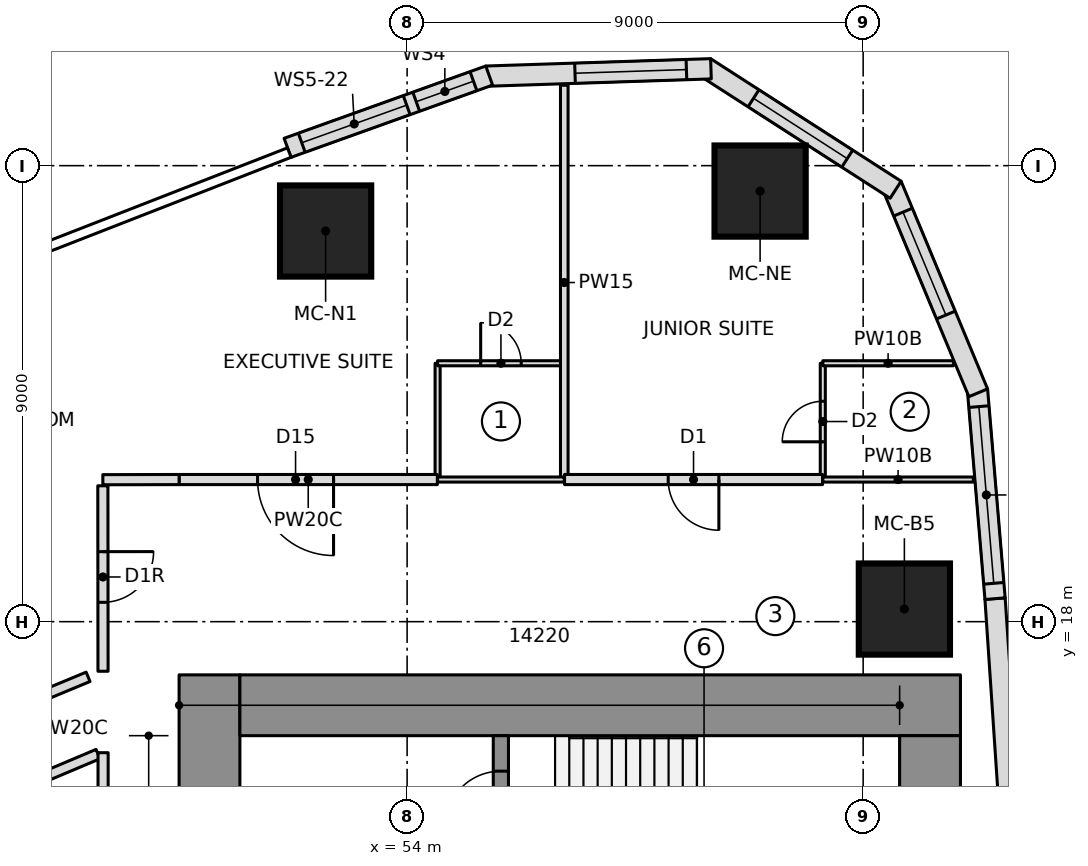
"""IFC4 building model, lengths in metres.
Left out: names, types, materials, properties, quantities, classifications, styles, units other than length and angle.
Written with IfcOpenShell. Run it as: python <this file> out.ifc"""

import sys

from ifc_helpers import new_model, si_unit, direction, frame, frame_2d, origin, origin_2d, place, context, subcontext, project, spatial, polyline, rectangle, outline, extrude, element, fill, save


model = new_model("IFC4")
c1 = context("Model", 3, precision=1e-05, world=origin(), true_north=direction((0.0, 1.0)))
c2 = subcontext(c1, "Body", "Model", "MODEL_VIEW")
j1 = project(units=[si_unit("LENGTHUNIT", "METRE"), si_unit("PLANEANGLEUNIT", "RADIAN")], contexts=[c1])
p1 = place(None, origin())
s1 = spatial("IfcSite", under=j1, at=p1, CompositionType="ELEMENT")
p2 = place(p1, origin())
s2 = spatial("IfcBuilding", under=s1, at=p2, CompositionType="ELEMENT")
p3 = place(p2, frame((0.0, 0.0, 71.55)))
s3 = spatial("IfcBuildingStorey", under=s2, at=p3, CompositionType="ELEMENT", Elevation=71.55)
p4 = place(p3, frame((50.1, 6.65, 0.0), z_axis=(0.0, 0.0, 1.0), x_axis=(0.0, 1.0, 0.0)))
e1 = element("IfcWall", 1, at=p4, inside=s3, PredefinedType="SHEAR", context=c2, shape_type="SweptSolid", body=[
    extrude(rectangle(XDim=10.3, YDim=1.2, at=frame_2d((5.15, 0.0))), origin(), (0.0, 0.0, 1.0), 3.55),
])
p5 = place(p4, frame((6.5, 0.0, 0.0)))
e2 = element("IfcOpeningElement", 2, at=p5, cuts=e1, PredefinedType="OPENING", context=c2, shape_type="SweptSolid", body=[
    extrude(rectangle(XDim=1.1, YDim=2.1, at=frame_2d((0.55, 1.05))), frame((0.0, 0.61, 0.0), z_axis=(0.0, -1.0, 0.0), x_axis=(1.0, 0.0, 0.0)), (0.0, 0.0, 1.0), 1.22),
])
p6 = place(p3, frame((50.7, 16.35, 0.0), z_axis=(0.0, 0.0, 1.0), x_axis=(1.0, 0.0, 0.0)))
e3 = element("IfcWall", 3, at=p6, inside=s3, PredefinedType="SHEAR", context=c2, shape_type="SweptSolid", body=[
    extrude(rectangle(XDim=14.22, YDim=1.2, at=frame_2d((7.11, 0.0))), origin(), (0.0, 0.0, 1.0), 3.55),
])
p7 = place(p3, frame((64.32, 9.95, 0.0), z_axis=(0.0, 0.0, 1.0), x_axis=(0.0, 1.0, 0.0)))
e4 = element("IfcWall", 4, at=p7, inside=s3, PredefinedType="SHEAR", context=c2, shape_type="SweptSolid", body=[
    extrude(rectangle(XDim=5.8, YDim=1.2, at=frame_2d((2.9, 0.0))), origin(), (0.0, 0.0, 1.0), 3.55),
])
p8 = place(p3, frame((55.85, 10.35, 0.0), z_axis=(0.0, 0.0, 1.0), x_axis=(0.0, 1.0, 0.0)))
e5 = element("IfcWall", 5, at=p8, inside=s3, PredefinedType="SHEAR", context=c2, shape_type="SweptSolid", body=[
    extrude(rectangle(XDim=5.4, YDim=0.3, at=frame_2d((2.7, 0.0))), origin(), (0.0, 0.0, 1.0), 3.55),
])
p9 = place(p8, frame((1.43, 0.0, 0.0)))
e6 = element("IfcOpeningElement", 6, at=p9, cuts=e5, PredefinedType="OPENING", context=c2, shape_type="SweptSolid", body=[
    extrude(rectangle(XDim=1.1, YDim=2.1, at=frame_2d((0.55, 1.05))), frame((0.0, 0.16, 0.0), z_axis=(0.0, -1.0, 0.0), x_axis=(1.0, 0.0, 0.0)), (0.0, 0.0, 1.0), 0.32),
])
p10 = place(p8, frame((3.6, 0.0, 0.0)))
e7 = element("IfcOpeningElement", 7, at=p10, cuts=e5, PredefinedType="OPENING", context=c2, shape_type="SweptSolid", body=[
    extrude(rectangle(XDim=1.1, YDim=2.1, at=frame_2d((0.55, 1.05))), frame((0.0, 0.16, 0.0), z_axis=(0.0, -1.0, 0.0), x_axis=(1.0, 0.0, 0.0)), (0.0, 0.0, 1.0), 0.32),
])
for number, where, z_axis, x_axis in (
    (8, (63.813, 18.249, 0.0), (0.0, 0.0, 1.0), (1.0, 0.0, 0.0)),
    (9, (60.966, 26.499, 0.0), (0.0, 0.0, 1.0), (1.0, 0.0, 0.0)),
    (10, (52.392, 25.71, 0.0), (0.0, 0.0, 1.0), (1.0, 0.0, 0.0)),
):
    element("IfcColumn", number, at=place(p3, frame(where, z_axis=z_axis, x_axis=x_axis)), inside=s3, PredefinedType="COLUMN", context=c2, shape_type="SweptSolid", body=[
        extrude(rectangle(XDim=1.8, YDim=1.8, at=origin_2d()), origin(), (0.0, 0.0, 1.0), 3.55),
    ])
p11 = place(p3, frame((65.878, 14.36, 0.0), z_axis=(0.0, 0.0, 1.0), x_axis=(-0.067087430225, 0.997747100575, 0.0)))
e11 = element("IfcWall", 11, at=p11, inside=s3, PredefinedType="NOTDEFINED", context=c2, shape_type="SweptSolid", body=[
    extrude(outline(polyline([(-0.002, -0.2), (4.107, -0.2), (4.103, 0.2), (0.002, 0.2), (-0.002, -0.2)])), origin(), (0.0, 0.0, 1.0), 3.25),
])
p12 = place(p3, frame((65.603, 18.455, 0.0), z_axis=(0.0, 0.0, 1.0), x_axis=(-0.083793550906, 0.996483136248, 0.0)))
e12 = element("IfcWall", 12, at=p12, inside=s3, PredefinedType="NOTDEFINED", context=c2, shape_type="SweptSolid", body=[
    extrude(outline(polyline([(-0.002, -0.2), (4.136, -0.2), (4.074, 0.2), (0.002, 0.2), (-0.002, -0.2)])), origin(), (0.0, 0.0, 1.0), 3.25),
])
p13 = place(p12, frame((0.302, 0.0, 0.9)))
e13 = element("IfcOpeningElement", 13, at=p13, cuts=e12, PredefinedType="OPENING", context=c2, shape_type="SweptSolid", body=[
    extrude(rectangle(XDim=3.5, YDim=1.8, at=frame_2d((1.75, 0.9))), frame((0.0, 0.21, 0.0), z_axis=(0.0, -1.0, 0.0), x_axis=(1.0, 0.0, 0.0)), (0.0, 0.0, 1.0), 0.42),
])
p14 = place(p3, frame((65.259, 22.546, 0.0), z_axis=(0.0, 0.0, 1.0), x_axis=(-0.384372042685, 0.923178277908, 0.0)))
e14 = element("IfcWall", 14, at=p14, inside=s3, PredefinedType="NOTDEFINED", context=c2, shape_type="SweptSolid", body=[
    extrude(outline(polyline([(-0.031, -0.2), (4.408, -0.2), (4.283, 0.2), (0.031, 0.2), (-0.031, -0.2)])), origin(), (0.0, 0.0, 1.0), 3.25),
])
p15 = place(p14, frame((1.631, 0.0, 0.6)))
e15 = element("IfcOpeningElement", 15, at=p15, cuts=e14, PredefinedType="OPENING", context=c2, shape_type="SweptSolid", body=[
    extrude(outline(polyline([(0.0, 1.35), (0.084, 1.771), (0.322, 2.128), (0.679, 2.366), (1.1, 2.45), (1.521, 2.366), (1.878, 2.128), (2.116, 1.771), (2.2, 1.35), (2.2, 1.1), (2.116, 0.679), (1.878, 0.322), (1.521, 0.084), (1.1, 0.0), (0.679, 0.084), (0.322, 0.322), (0.084, 0.679), (0.0, 1.1), (0.0, 1.35)])), frame((0.0, 0.21, 0.0), z_axis=(0.0, -1.0, 0.0), x_axis=(1.0, 0.0, 0.0)), (0.0, 0.0, 1.0), 0.42),
])
p16 = place(p3, frame((63.588, 26.558, 0.0), z_axis=(0.0, 0.0, 1.0), x_axis=(-0.840937468718, 0.541132307025, 0.0)))
e16 = element("IfcWall", 16, at=p16, inside=s3, PredefinedType="NOTDEFINED", context=c2, shape_type="SweptSolid", body=[
    extrude(outline(polyline([(-0.062, -0.2), (4.409, -0.2), (4.284, 0.2), (0.062, 0.2), (-0.062, -0.2)])), origin(), (0.0, 0.0, 1.0), 3.25),
])
p17 = place(p16, frame((1.073, 0.0, 0.6)))
e17 = element("IfcOpeningElement", 17, at=p17, cuts=e16, PredefinedType="OPENING", context=c2, shape_type="SweptSolid", body=[
    extrude(outline(polyline([(0.0, 1.35), (0.084, 1.771), (0.322, 2.128), (0.679, 2.366), (1.1, 2.45), (1.521, 2.366), (1.878, 2.128), (2.116, 1.771), (2.2, 1.35), (2.2, 1.1), (2.116, 0.679), (1.878, 0.322), (1.521, 0.084), (1.1, 0.0), (0.679, 0.084), (0.322, 0.322), (0.084, 0.679), (0.0, 1.1), (0.0, 1.35)])), frame((0.0, 0.21, 0.0), z_axis=(0.0, -1.0, 0.0), x_axis=(1.0, 0.0, 0.0)), (0.0, 0.0, 1.0), 0.42),
])
p18 = place(p3, frame((59.934, 28.91, 0.0), z_axis=(0.0, 0.0, 1.0), x_axis=(-0.999463576228, -0.032749958686, 0.0)))
e18 = element("IfcWall", 18, at=p18, inside=s3, PredefinedType="NOTDEFINED", context=c2, shape_type="SweptSolid", body=[
    extrude(outline(polyline([(-0.062, -0.2), (4.378, -0.2), (4.315, 0.2), (0.062, 0.2), (-0.062, -0.2)])), origin(), (0.0, 0.0, 1.0), 3.25),
])
p19 = place(p18, frame((0.422, 0.0, 0.6)))
e19 = element("IfcOpeningElement", 19, at=p19, cuts=e18, PredefinedType="OPENING", context=c2, shape_type="SweptSolid", body=[
    extrude(outline(polyline([(0.0, 1.35), (0.084, 1.771), (0.322, 2.128), (0.679, 2.366), (1.1, 2.45), (1.521, 2.366), (1.878, 2.128), (2.116, 1.771), (2.2, 1.35), (2.2, 1.1), (2.116, 0.679), (1.878, 0.322), (1.521, 0.084), (1.1, 0.0), (0.679, 0.084), (0.322, 0.322), (0.084, 0.679), (0.0, 1.1), (0.0, 1.35)])), frame((0.0, 0.21, 0.0), z_axis=(0.0, -1.0, 0.0), x_axis=(1.0, 0.0, 0.0)), (0.0, 0.0, 1.0), 0.42),
])
p20 = place(p3, frame((55.59, 28.768, 0.0), z_axis=(0.0, 0.0, 1.0), x_axis=(-0.941339752885, -0.337460323057, 0.0)))
e20 = element("IfcWall", 20, at=p20, inside=s3, PredefinedType="NOTDEFINED", context=c2, shape_type="SweptSolid", body=[
    extrude(outline(polyline([(-0.031, -0.2), (4.196, -0.2), (4.196, 0.2), (0.031, 0.2), (-0.031, -0.2)])), origin(), (0.0, 0.0, 1.0), 3.25),
])
p21 = place(p20, frame((0.298, 0.0, 0.9)))
e21 = element("IfcOpeningElement", 21, at=p21, cuts=e20, PredefinedType="OPENING", context=c2, shape_type="SweptSolid", body=[
    extrude(rectangle(XDim=1.2, YDim=1.8, at=frame_2d((0.6, 0.9))), frame((0.0, 0.21, 0.0), z_axis=(0.0, -1.0, 0.0), x_axis=(1.0, 0.0, 0.0)), (0.0, 0.0, 1.0), 0.42),
])
p22 = place(p20, frame((1.698, 0.0, 0.9)))
e22 = element("IfcOpeningElement", 22, at=p22, cuts=e20, PredefinedType="OPENING", context=c2, shape_type="SweptSolid", body=[
    extrude(rectangle(XDim=2.2, YDim=1.8, at=frame_2d((1.1, 0.9))), frame((0.0, 0.21, 0.0), z_axis=(0.0, -1.0, 0.0), x_axis=(1.0, 0.0, 0.0)), (0.0, 0.0, 1.0), 0.42),
])
p23 = place(p3, frame((54.602, 20.8, 0.0), z_axis=(0.0, 0.0, 1.0), x_axis=(0.0, 1.0, 0.0)))
e23 = element("IfcWall", 23, at=p23, inside=s3, PredefinedType="PARTITIONING", context=c2, shape_type="SweptSolid", body=[
    extrude(rectangle(XDim=2.3, YDim=0.1, at=frame_2d((1.15, 0.0))), origin(), (0.0, 0.0, 1.0), 3.15),
])
p24 = place(p3, frame((54.602, 23.1, 0.0), z_axis=(0.0, 0.0, 1.0), x_axis=(1.0, 0.0, 0.0)))
e24 = element("IfcWall", 24, at=p24, inside=s3, PredefinedType="PARTITIONING", context=c2, shape_type="SweptSolid", body=[
    extrude(rectangle(XDim=2.5, YDim=0.1, at=frame_2d((1.25, 0.0))), origin(), (0.0, 0.0, 1.0), 3.15),
])
p25 = place(p24, frame((0.85, 0.0, 0.0)))
e25 = element("IfcOpeningElement", 25, at=p25, cuts=e24, PredefinedType="OPENING", context=c2, shape_type="SweptSolid", body=[
    extrude(rectangle(XDim=0.8, YDim=2.1, at=frame_2d((0.4, 1.05))), frame((0.0, 0.06, 0.0), z_axis=(0.0, -1.0, 0.0), x_axis=(1.0, 0.0, 0.0)), (0.0, 0.0, 1.0), 0.12),
])
p26 = place(p3, frame((62.203, 20.8, 0.0), z_axis=(0.0, 0.0, 1.0), x_axis=(0.0, 1.0, 0.0)))
e26 = element("IfcWall", 26, at=p26, inside=s3, PredefinedType="PARTITIONING", context=c2, shape_type="SweptSolid", body=[
    extrude(rectangle(XDim=2.3, YDim=0.1, at=frame_2d((1.15, 0.0))), origin(), (0.0, 0.0, 1.0), 3.15),
])
p27 = place(p26, frame((0.75, 0.0, 0.0)))
e27 = element("IfcOpeningElement", 27, at=p27, cuts=e26, PredefinedType="OPENING", context=c2, shape_type="SweptSolid", body=[
    extrude(rectangle(XDim=0.8, YDim=2.1, at=frame_2d((0.4, 1.05))), frame((0.0, 0.06, 0.0), z_axis=(0.0, -1.0, 0.0), x_axis=(1.0, 0.0, 0.0)), (0.0, 0.0, 1.0), 0.12),
])
p28 = place(p3, frame((62.203, 23.1, 0.0), z_axis=(0.0, 0.0, 1.0), x_axis=(1.0, 0.0, 0.0)))
e28 = element("IfcWall", 28, at=p28, inside=s3, PredefinedType="PARTITIONING", context=c2, shape_type="SweptSolid", body=[
    extrude(rectangle(XDim=2.578, YDim=0.1, at=frame_2d((1.289, 0.0))), origin(), (0.0, 0.0, 1.0), 3.15),
])
p29 = place(p3, frame((57.102, 20.8, 0.0), z_axis=(0.0, 0.0, 1.0), x_axis=(0.0, 1.0, 0.0)))
e29 = element("IfcWall", 29, at=p29, inside=s3, PredefinedType="PARTITIONING", context=c2, shape_type="SweptSolid", body=[
    extrude(rectangle(XDim=7.787, YDim=0.15, at=frame_2d((3.894, 0.0))), origin(), (0.0, 0.0, 1.0), 3.15),
])
p30 = place(p3, frame((43.85, 13.677, 0.0), z_axis=(0.0, 0.0, 1.0), x_axis=(0.921265924084, 0.388933281068, 0.0)))
e30 = element("IfcWall", 30, at=p30, inside=s3, PredefinedType="PARTITIONING", context=c2, shape_type="SweptSolid", body=[
    extrude(rectangle(XDim=4.396, YDim=0.2, at=frame_2d((2.198, 0.0))), origin(), (0.0, 0.0, 1.0), 3.15),
])
p31 = place(p30, frame((1.508, 0.0, 0.0)))
e31 = element("IfcOpeningElement", 31, at=p31, cuts=e30, PredefinedType="OPENING", context=c2, shape_type="SweptSolid", body=[
    extrude(rectangle(XDim=1.5, YDim=2.1, at=frame_2d((0.75, 1.05))), frame((0.0, 0.11, 0.0), z_axis=(0.0, -1.0, 0.0), x_axis=(1.0, 0.0, 0.0)), (0.0, 0.0, 1.0), 0.22),
])
p32 = place(p3, frame((54.597, 20.805, 0.0), z_axis=(0.0, 0.0, 1.0), x_axis=(-1.0, 0.0, 0.0)))
e32 = element("IfcWall", 32, at=p32, inside=s3, PredefinedType="PARTITIONING", context=c2, shape_type="SweptSolid", body=[
    extrude(rectangle(XDim=5.097, YDim=0.2, at=frame_2d((2.548, 0.0))), origin(), (0.0, 0.0, 1.0), 3.15),
])
p33 = place(p32, frame((2.048, 0.0, 0.0)))
e33 = element("IfcOpeningElement", 33, at=p33, cuts=e32, PredefinedType="OPENING", context=c2, shape_type="SweptSolid", body=[
    extrude(rectangle(XDim=1.5, YDim=2.1, at=frame_2d((0.75, 1.05))), frame((0.0, 0.11, 0.0), z_axis=(0.0, -1.0, 0.0), x_axis=(1.0, 0.0, 0.0)), (0.0, 0.0, 1.0), 0.22),
])
p34 = place(p3, frame((62.198, 20.805, 0.0), z_axis=(0.0, 0.0, 1.0), x_axis=(-1.0, 0.0, 0.0)))
e34 = element("IfcWall", 34, at=p34, inside=s3, PredefinedType="PARTITIONING", context=c2, shape_type="SweptSolid", body=[
    extrude(rectangle(XDim=5.092, YDim=0.2, at=frame_2d((2.546, 0.0))), origin(), (0.0, 0.0, 1.0), 3.15),
])
p35 = place(p34, frame((2.046, 0.0, 0.0)))
e35 = element("IfcOpeningElement", 35, at=p35, cuts=e34, PredefinedType="OPENING", context=c2, shape_type="SweptSolid", body=[
    extrude(rectangle(XDim=1.0, YDim=2.1, at=frame_2d((0.5, 1.05))), frame((0.0, 0.11, 0.0), z_axis=(0.0, -1.0, 0.0), x_axis=(1.0, 0.0, 0.0)), (0.0, 0.0, 1.0), 0.22),
])
p36 = place(p3, frame((57.102, 20.805, 0.0), z_axis=(0.0, 0.0, 1.0), x_axis=(-1.0, 0.0, 0.0)))
e36 = element("IfcWall", 36, at=p36, inside=s3, PredefinedType="PARTITIONING", context=c2, shape_type="SweptSolid", body=[
    extrude(rectangle(XDim=2.5, YDim=0.1, at=frame_2d((1.25, 0.0))), origin(), (0.0, 0.0, 1.0), 3.15),
])
p37 = place(p3, frame((65.175, 20.805, 0.0), z_axis=(0.0, 0.0, 1.0), x_axis=(-1.0, 0.0, 0.0)))
e37 = element("IfcWall", 37, at=p37, inside=s3, PredefinedType="PARTITIONING", context=c2, shape_type="SweptSolid", body=[
    extrude(rectangle(XDim=2.971, YDim=0.1, at=frame_2d((1.486, 0.0))), origin(), (0.0, 0.0, 1.0), 3.15),
])
p38 = place(p3, frame((47.704, 16.911, 0.0), z_axis=(0.0, 0.0, 1.0), x_axis=(-0.923461497361, -0.383691103484, 0.0)))
e38 = element("IfcWall", 38, at=p38, inside=s3, PredefinedType="PARTITIONING", context=c2, shape_type="SweptSolid", body=[
    extrude(rectangle(XDim=5.328, YDim=0.2, at=frame_2d((2.664, 0.0))), origin(), (0.0, 0.0, 1.0), 3.15),
])
p39 = place(p3, frame((48.0, 15.414, 0.0), z_axis=(0.0, 0.0, 1.0), x_axis=(0.0, -1.0, 0.0)))
e39 = element("IfcWall", 39, at=p39, inside=s3, PredefinedType="PARTITIONING", context=c2, shape_type="SweptSolid", body=[
    extrude(rectangle(XDim=30.828, YDim=0.2, at=frame_2d((15.414, 0.0))), origin(), (0.0, 0.0, 1.0), 3.15),
])
p40 = place(p3, frame((49.5, 20.805, 0.0), z_axis=(0.0, 0.0, 1.0), x_axis=(-0.999998104399, -0.001947099992, 0.0)))
e40 = element("IfcWall", 40, at=p40, inside=s3, PredefinedType="PARTITIONING", context=c2, shape_type="SweptSolid", body=[
    extrude(rectangle(XDim=1.505, YDim=0.2, at=frame_2d((0.752, 0.0))), origin(), (0.0, 0.0, 1.0), 3.15),
])
p41 = place(p3, frame((47.996, 20.682, 0.0), z_axis=(0.0, 0.0, 1.0), x_axis=(0.000866955326, -0.999999624194, 0.0)))
e41 = element("IfcWall", 41, at=p41, inside=s3, PredefinedType="PARTITIONING", context=c2, shape_type="SweptSolid", body=[
    extrude(rectangle(XDim=3.661, YDim=0.2, at=frame_2d((1.831, 0.0))), origin(), (0.0, 0.0, 1.0), 3.15),
])
p42 = place(p41, frame((1.3, 0.0, 0.0)))
e42 = element("IfcOpeningElement", 42, at=p42, cuts=e41, PredefinedType="OPENING", context=c2, shape_type="SweptSolid", body=[
    extrude(rectangle(XDim=1.0, YDim=2.1, at=frame_2d((0.5, 1.05))), frame((0.0, 0.11, 0.0), z_axis=(0.0, -1.0, 0.0), x_axis=(1.0, 0.0, 0.0)), (0.0, 0.0, 1.0), 0.22),
])
p43 = place(p13, origin())
e43 = element("IfcWindow", 43, at=p43, inside=s3, PartitioningType="SINGLE_PANEL", PredefinedType="WINDOW", context=c2, shape_type="SweptSolid", body=[
    extrude(rectangle(XDim=3.5, YDim=1.8, at=frame_2d((1.75, 0.9))), frame((0.0, 0.17, 0.0), z_axis=(0.0, -1.0, 0.0), x_axis=(1.0, 0.0, 0.0)), (0.0, 0.0, 1.0), 0.06),
])
fill(e13, e43)
p44 = place(p15, origin())
e44 = element("IfcWindow", 44, at=p44, inside=s3, PartitioningType="SINGLE_PANEL", PredefinedType="WINDOW", context=c2, shape_type="SweptSolid", body=[
    extrude(outline(polyline([(0.0, 1.35), (0.084, 1.771), (0.322, 2.128), (0.679, 2.366), (1.1, 2.45), (1.521, 2.366), (1.878, 2.128), (2.116, 1.771), (2.2, 1.35), (2.2, 1.1), (2.116, 0.679), (1.878, 0.322), (1.521, 0.084), (1.1, 0.0), (0.679, 0.084), (0.322, 0.322), (0.084, 0.679), (0.0, 1.1), (0.0, 1.35)])), frame((0.0, 0.17, 0.0), z_axis=(0.0, -1.0, 0.0), x_axis=(1.0, 0.0, 0.0)), (0.0, 0.0, 1.0), 0.06),
])
fill(e15, e44)
p45 = place(p17, origin())
e45 = element("IfcWindow", 45, at=p45, inside=s3, PartitioningType="SINGLE_PANEL", PredefinedType="WINDOW", context=c2, shape_type="SweptSolid", body=[
    extrude(outline(polyline([(0.0, 1.35), (0.084, 1.771), (0.322, 2.128), (0.679, 2.366), (1.1, 2.45), (1.521, 2.366), (1.878, 2.128), (2.116, 1.771), (2.2, 1.35), (2.2, 1.1), (2.116, 0.679), (1.878, 0.322), (1.521, 0.084), (1.1, 0.0), (0.679, 0.084), (0.322, 0.322), (0.084, 0.679), (0.0, 1.1), (0.0, 1.35)])), frame((0.0, 0.17, 0.0), z_axis=(0.0, -1.0, 0.0), x_axis=(1.0, 0.0, 0.0)), (0.0, 0.0, 1.0), 0.06),
])
fill(e17, e45)
p46 = place(p19, origin())
e46 = element("IfcWindow", 46, at=p46, inside=s3, PartitioningType="SINGLE_PANEL", PredefinedType="WINDOW", context=c2, shape_type="SweptSolid", body=[
    extrude(outline(polyline([(0.0, 1.35), (0.084, 1.771), (0.322, 2.128), (0.679, 2.366), (1.1, 2.45), (1.521, 2.366), (1.878, 2.128), (2.116, 1.771), (2.2, 1.35), (2.2, 1.1), (2.116, 0.679), (1.878, 0.322), (1.521, 0.084), (1.1, 0.0), (0.679, 0.084), (0.322, 0.322), (0.084, 0.679), (0.0, 1.1), (0.0, 1.35)])), frame((0.0, 0.17, 0.0), z_axis=(0.0, -1.0, 0.0), x_axis=(1.0, 0.0, 0.0)), (0.0, 0.0, 1.0), 0.06),
])
fill(e19, e46)
p47 = place(p21, origin())
e47 = element("IfcWindow", 47, at=p47, inside=s3, PartitioningType="SINGLE_PANEL", PredefinedType="WINDOW", context=c2, shape_type="SweptSolid", body=[
    extrude(rectangle(XDim=1.2, YDim=1.8, at=frame_2d((0.6, 0.9))), frame((0.0, 0.17, 0.0), z_axis=(0.0, -1.0, 0.0), x_axis=(1.0, 0.0, 0.0)), (0.0, 0.0, 1.0), 0.06),
])
fill(e21, e47)
p48 = place(p22, origin())
e48 = element("IfcWindow", 48, at=p48, inside=s3, PartitioningType="SINGLE_PANEL", PredefinedType="WINDOW", context=c2, shape_type="SweptSolid", body=[
    extrude(rectangle(XDim=2.2, YDim=1.8, at=frame_2d((1.1, 0.9))), frame((0.0, 0.17, 0.0), z_axis=(0.0, -1.0, 0.0), x_axis=(1.0, 0.0, 0.0)), (0.0, 0.0, 1.0), 0.06),
])
fill(e22, e48)
p49 = place(p25, origin())
e49 = element("IfcDoor", 49, at=p49, inside=s3, OperationType="SINGLE_SWING_LEFT", PredefinedType="DOOR", context=c2, shape_type="SweptSolid", body=[
    extrude(rectangle(XDim=0.8, YDim=2.1, at=frame_2d((0.4, 1.05))), frame((0.0, 0.025, 0.0), z_axis=(0.0, -1.0, 0.0), x_axis=(1.0, 0.0, 0.0)), (0.0, 0.0, 1.0), 0.05),
])
fill(e25, e49)
p50 = place(p27, origin())
e50 = element("IfcDoor", 50, at=p50, inside=s3, OperationType="SINGLE_SWING_LEFT", PredefinedType="DOOR", context=c2, shape_type="SweptSolid", body=[
    extrude(rectangle(XDim=0.8, YDim=2.1, at=frame_2d((0.4, 1.05))), frame((0.0, 0.025, 0.0), z_axis=(0.0, -1.0, 0.0), x_axis=(1.0, 0.0, 0.0)), (0.0, 0.0, 1.0), 0.05),
])
fill(e27, e50)
p51 = place(p33, origin())
e51 = element("IfcDoor", 51, at=p51, inside=s3, OperationType="DOUBLE_DOOR_SINGLE_SWING", PredefinedType="DOOR", context=c2, shape_type="SweptSolid", body=[
    extrude(rectangle(XDim=1.5, YDim=2.1, at=frame_2d((0.75, 1.05))), frame((0.0, 0.025, 0.0), z_axis=(0.0, -1.0, 0.0), x_axis=(1.0, 0.0, 0.0)), (0.0, 0.0, 1.0), 0.05),
])
fill(e33, e51)
p52 = place(p35, origin())
e52 = element("IfcDoor", 52, at=p52, inside=s3, OperationType="SINGLE_SWING_LEFT", PredefinedType="DOOR", context=c2, shape_type="SweptSolid", body=[
    extrude(rectangle(XDim=1.0, YDim=2.1, at=frame_2d((0.5, 1.05))), frame((0.0, 0.025, 0.0), z_axis=(0.0, -1.0, 0.0), x_axis=(1.0, 0.0, 0.0)), (0.0, 0.0, 1.0), 0.05),
])
fill(e35, e52)
p53 = place(p42, origin())
e53 = element("IfcDoor", 53, at=p53, inside=s3, OperationType="SINGLE_SWING_RIGHT", PredefinedType="DOOR", context=c2, shape_type="SweptSolid", body=[
    extrude(rectangle(XDim=1.0, YDim=2.1, at=frame_2d((0.5, 1.05))), frame((0.0, 0.025, 0.0), z_axis=(0.0, -1.0, 0.0), x_axis=(1.0, 0.0, 0.0)), (0.0, 0.0, 1.0), 0.05),
])
fill(e42, e53)
p54 = place(p10, origin())
e54 = element("IfcDoor", 54, at=p54, inside=s3, OperationType="SINGLE_SWING_RIGHT", PredefinedType="DOOR", context=c2, shape_type="SweptSolid", body=[
    extrude(rectangle(XDim=1.1, YDim=2.1, at=frame_2d((0.55, 1.05))), frame((0.0, 0.025, 0.0), z_axis=(0.0, -1.0, 0.0), x_axis=(1.0, 0.0, 0.0)), (0.0, 0.0, 1.0), 0.05),
])
fill(e7, e54)
save(model, sys.argv[1])
